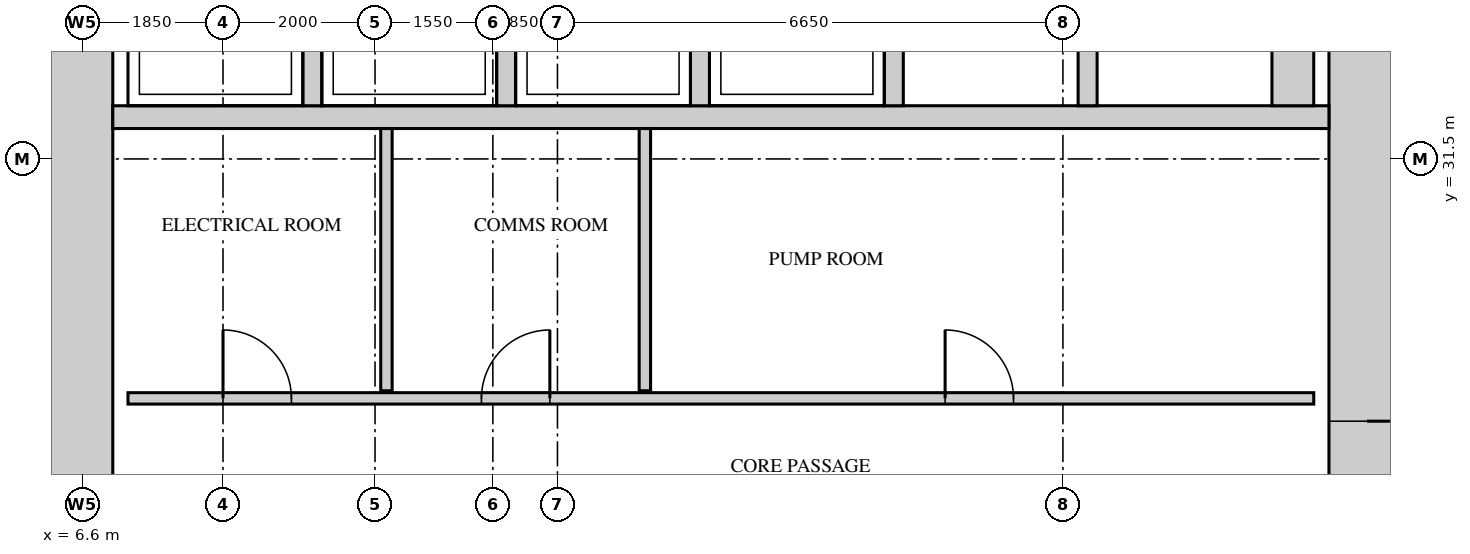
"""IFC4 building model, lengths in metres.
Left out: names, types, materials, properties, quantities, classifications, styles, units other than length and angle.
Written with IfcOpenShell. Run it as: python <this file> out.ifc"""

import sys

from ifc_helpers import new_model, si_unit, direction, frame, frame_2d, origin, place, context, subcontext, project, spatial, rectangle, extrude, source, transform, mapped, element, fill, save


model = new_model("IFC4")
c1 = context("Model", 3, precision=1e-05, world=origin(), true_north=direction((0.0, 1.0)))
c2 = subcontext(c1, "Body", "Model", "MODEL_VIEW")
j1 = project(units=[si_unit("LENGTHUNIT", "METRE"), si_unit("PLANEANGLEUNIT", "RADIAN")], contexts=[c1])
p1 = place(None, origin())
s1 = spatial("IfcSite", under=j1, at=p1, CompositionType="ELEMENT")
p2 = place(p1, origin())
s2 = spatial("IfcBuilding", under=s1, at=p2, CompositionType="ELEMENT")
p3 = place(p2, frame((0.0, 0.0, 123.5)))
s3 = spatial("IfcBuildingStorey", under=s2, at=p3, CompositionType="ELEMENT", Elevation=123.5)
m1 = source(origin(), c2, "Body", "SweptSolid", [
    extrude(rectangle(XDim=28.0, YDim=1.0, at=frame_2d((14.0, 0.0))), origin(), (0.0, 0.0, 1.0), 4.1),
])
p4 = place(p3, frame((23.5, 13.0, 0.0), z_axis=(0.0, 0.0, 1.0), x_axis=(0.0, 1.0, 0.0)))
e1 = element("IfcWall", 1, at=p4, inside=s3, PredefinedType="SHEAR", context=c2, shape_type="MappedRepresentation", body=[
    mapped(m1, transform((0.0, 0.0, 0.0))),
])
m2 = source(origin(), c2, "Body", "SweptSolid", [
    extrude(rectangle(XDim=1.8, YDim=2.1, at=frame_2d((0.9, 1.05))), frame((0.0, 0.51, 0.0), z_axis=(0.0, -1.0, 0.0), x_axis=(1.0, 0.0, 0.0)), (0.0, 0.0, 1.0), 1.02),
])
p5 = place(p4, frame((22.6, 0.0, 0.0)))
e2 = element("IfcOpeningElement", 2, at=p5, cuts=e1, PredefinedType="OPENING", context=c2, shape_type="MappedRepresentation", body=[
    mapped(m2, transform((0.0, 0.0, 0.0))),
])
m3 = source(origin(), c2, "Body", "SweptSolid", [
    extrude(rectangle(XDim=1.2, YDim=2.1, at=frame_2d((0.6, 1.05))), frame((0.0, 0.51, 0.0), z_axis=(0.0, -1.0, 0.0), x_axis=(1.0, 0.0, 0.0)), (0.0, 0.0, 1.0), 1.02),
])
p6 = place(p4, frame((13.85, 0.0, 0.0)))
e3 = element("IfcOpeningElement", 3, at=p6, cuts=e1, PredefinedType="OPENING", context=c2, shape_type="MappedRepresentation", body=[
    mapped(m3, transform((0.0, 0.0, 0.0))),
])
m4 = source(origin(), c2, "Body", "SweptSolid", [
    extrude(rectangle(XDim=0.9, YDim=2.1, at=frame_2d((0.45, 1.05))), frame((0.0, 0.51, 0.0), z_axis=(0.0, -1.0, 0.0), x_axis=(1.0, 0.0, 0.0)), (0.0, 0.0, 1.0), 1.02),
])
p7 = place(p4, frame((2.15, 0.0, 0.0)))
e4 = element("IfcOpeningElement", 4, at=p7, cuts=e1, PredefinedType="OPENING", context=c2, shape_type="MappedRepresentation", body=[
    mapped(m4, transform((0.0, 0.0, 0.0))),
])
p8 = place(p4, frame((7.0, 0.0, 0.0)))
e5 = element("IfcOpeningElement", 5, at=p8, cuts=e1, PredefinedType="OPENING", context=c2, shape_type="MappedRepresentation", body=[
    mapped(m4, transform((0.0, 0.0, 0.0))),
])
p9 = place(p3, frame((6.5, 13.0, 0.0), z_axis=(0.0, 0.0, 1.0), x_axis=(0.0, 1.0, 0.0)))
e6 = element("IfcWall", 6, at=p9, inside=s3, PredefinedType="SHEAR", context=c2, shape_type="MappedRepresentation", body=[
    mapped(m1, transform((0.0, 0.0, 0.0))),
])
m5 = source(origin(), c2, "Body", "SweptSolid", [
    extrude(rectangle(XDim=16.0, YDim=0.3, at=frame_2d((8.0, 0.0))), origin(), (0.0, 0.0, 1.0), 4.1),
])
p10 = place(p3, frame((7.0, 32.05, 0.0), z_axis=(0.0, 0.0, 1.0), x_axis=(1.0, 0.0, 0.0)))
e7 = element("IfcWall", 7, at=p10, inside=s3, PredefinedType="STANDARD", context=c2, shape_type="MappedRepresentation", body=[
    mapped(m5, transform((0.0, 0.0, 0.0))),
])
m6 = source(origin(), c2, "Body", "SweptSolid", [
    extrude(rectangle(XDim=2.4, YDim=0.25, at=frame_2d((1.2, 0.0))), origin(), (0.0, 0.0, 1.0), 4.1),
])
for number, where, z_axis, x_axis in (
    (8, (9.625, 32.2, 0.0), (0.0, 0.0, 1.0), (0.0, 1.0, 0.0)),
    (9, (12.175, 32.2, 0.0), (0.0, 0.0, 1.0), (0.0, 1.0, 0.0)),
    (10, (14.725, 32.2, 0.0), (0.0, 0.0, 1.0), (0.0, 1.0, 0.0)),
    (11, (17.275, 32.2, 0.0), (0.0, 0.0, 1.0), (0.0, 1.0, 0.0)),
    (12, (19.825, 32.2, 0.0), (0.0, 0.0, 1.0), (0.0, 1.0, 0.0)),
):
    element("IfcWall", number, at=place(p3, frame(where, z_axis=z_axis, x_axis=x_axis)), inside=s3, PredefinedType="STANDARD", context=c2, shape_type="MappedRepresentation", body=[
        mapped(m6, transform((0.0, 0.0, 0.0))),
    ])
m7 = source(origin(), c2, "Body", "SweptSolid", [
    extrude(rectangle(XDim=2.4, YDim=0.55, at=frame_2d((1.2, 0.0))), origin(), (0.0, 0.0, 1.0), 4.1),
])
p11 = place(p3, frame((22.525, 32.2, 0.0), z_axis=(0.0, 0.0, 1.0), x_axis=(0.0, 1.0, 0.0)))
e13 = element("IfcWall", 13, at=p11, inside=s3, PredefinedType="STANDARD", context=c2, shape_type="MappedRepresentation", body=[
    mapped(m7, transform((0.0, 0.0, 0.0))),
])
m8 = source(origin(), c2, "Body", "SweptSolid", [
    extrude(rectangle(XDim=15.6, YDim=0.15, at=frame_2d((7.8, 0.0))), origin(), (0.0, 0.0, 1.0), 4.2),
])
p12 = place(p3, frame((7.2, 28.35, 0.0), z_axis=(0.0, 0.0, 1.0), x_axis=(1.0, 0.0, 0.0)))
e14 = element("IfcWall", 14, at=p12, inside=s3, PredefinedType="PARTITIONING", context=c2, shape_type="MappedRepresentation", body=[
    mapped(m8, transform((0.0, 0.0, 0.0))),
])
m9 = source(origin(), c2, "Body", "SweptSolid", [
    extrude(rectangle(XDim=0.9, YDim=2.1, at=frame_2d((0.45, 1.05))), frame((0.0, 0.085, 0.0), z_axis=(0.0, -1.0, 0.0), x_axis=(1.0, 0.0, 0.0)), (0.0, 0.0, 1.0), 0.17),
])
p13 = place(p12, frame((1.25, 0.0, 0.0)))
e15 = element("IfcOpeningElement", 15, at=p13, cuts=e14, PredefinedType="OPENING", context=c2, shape_type="MappedRepresentation", body=[
    mapped(m9, transform((0.0, 0.0, 0.0))),
])
p14 = place(p12, frame((4.65, 0.0, 0.0)))
e16 = element("IfcOpeningElement", 16, at=p14, cuts=e14, PredefinedType="OPENING", context=c2, shape_type="MappedRepresentation", body=[
    mapped(m9, transform((0.0, 0.0, 0.0))),
])
p15 = place(p12, frame((10.75, 0.0, 0.0)))
e17 = element("IfcOpeningElement", 17, at=p15, cuts=e14, PredefinedType="OPENING", context=c2, shape_type="MappedRepresentation", body=[
    mapped(m9, transform((0.0, 0.0, 0.0))),
])
m10 = source(origin(), c2, "Body", "SweptSolid", [
    extrude(rectangle(XDim=3.45, YDim=0.15, at=frame_2d((1.725, 0.0))), origin(), (0.0, 0.0, 1.0), 4.2),
])
for number, where, z_axis, x_axis in (
    (18, (10.6, 28.45, 0.0), (0.0, 0.0, 1.0), (0.0, 1.0, 0.0)),
    (19, (14.0, 28.45, 0.0), (0.0, 0.0, 1.0), (0.0, 1.0, 0.0)),
):
    element("IfcWall", number, at=place(p3, frame(where, z_axis=z_axis, x_axis=x_axis)), inside=s3, PredefinedType="PARTITIONING", context=c2, shape_type="MappedRepresentation", body=[
        mapped(m10, transform((0.0, 0.0, 0.0))),
    ])
m11 = source(origin(), c2, "Body", "SweptSolid", [
    extrude(rectangle(XDim=1.2, YDim=2.1, at=frame_2d((0.6, 1.05))), frame((0.0, 0.45, 0.0), z_axis=(0.0, -1.0, 0.0), x_axis=(1.0, 0.0, 0.0)), (0.0, 0.0, 1.0), 0.9),
])
p16 = place(p6, origin())
e20 = element("IfcDoor", 20, at=p16, inside=s3, OperationType="SINGLE_SWING_RIGHT", PredefinedType="DOOR", context=c2, shape_type="MappedRepresentation", body=[
    mapped(m11, transform((0.0, 0.0, 0.0))),
])
fill(e3, e20)
m12 = source(origin(), c2, "Body", "SweptSolid", [
    extrude(rectangle(XDim=0.9, YDim=2.1, at=frame_2d((0.45, 1.05))), frame((0.0, 0.025, 0.0), z_axis=(0.0, -1.0, 0.0), x_axis=(1.0, 0.0, 0.0)), (0.0, 0.0, 1.0), 0.05),
])
p17 = place(p13, origin())
e21 = element("IfcDoor", 21, at=p17, inside=s3, OperationType="SINGLE_SWING_RIGHT", PredefinedType="DOOR", context=c2, shape_type="MappedRepresentation", body=[
    mapped(m12, transform((0.0, 0.0, 0.0))),
])
fill(e15, e21)
p18 = place(p14, origin())
e22 = element("IfcDoor", 22, at=p18, inside=s3, OperationType="SINGLE_SWING_LEFT", PredefinedType="DOOR", context=c2, shape_type="MappedRepresentation", body=[
    mapped(m12, transform((0.0, 0.0, 0.0))),
])
fill(e16, e22)
p19 = place(p15, origin())
e23 = element("IfcDoor", 23, at=p19, inside=s3, OperationType="SINGLE_SWING_RIGHT", PredefinedType="DOOR", context=c2, shape_type="MappedRepresentation", body=[
    mapped(m12, transform((0.0, 0.0, 0.0))),
])
fill(e17, e23)
save(model, sys.argv[1])
